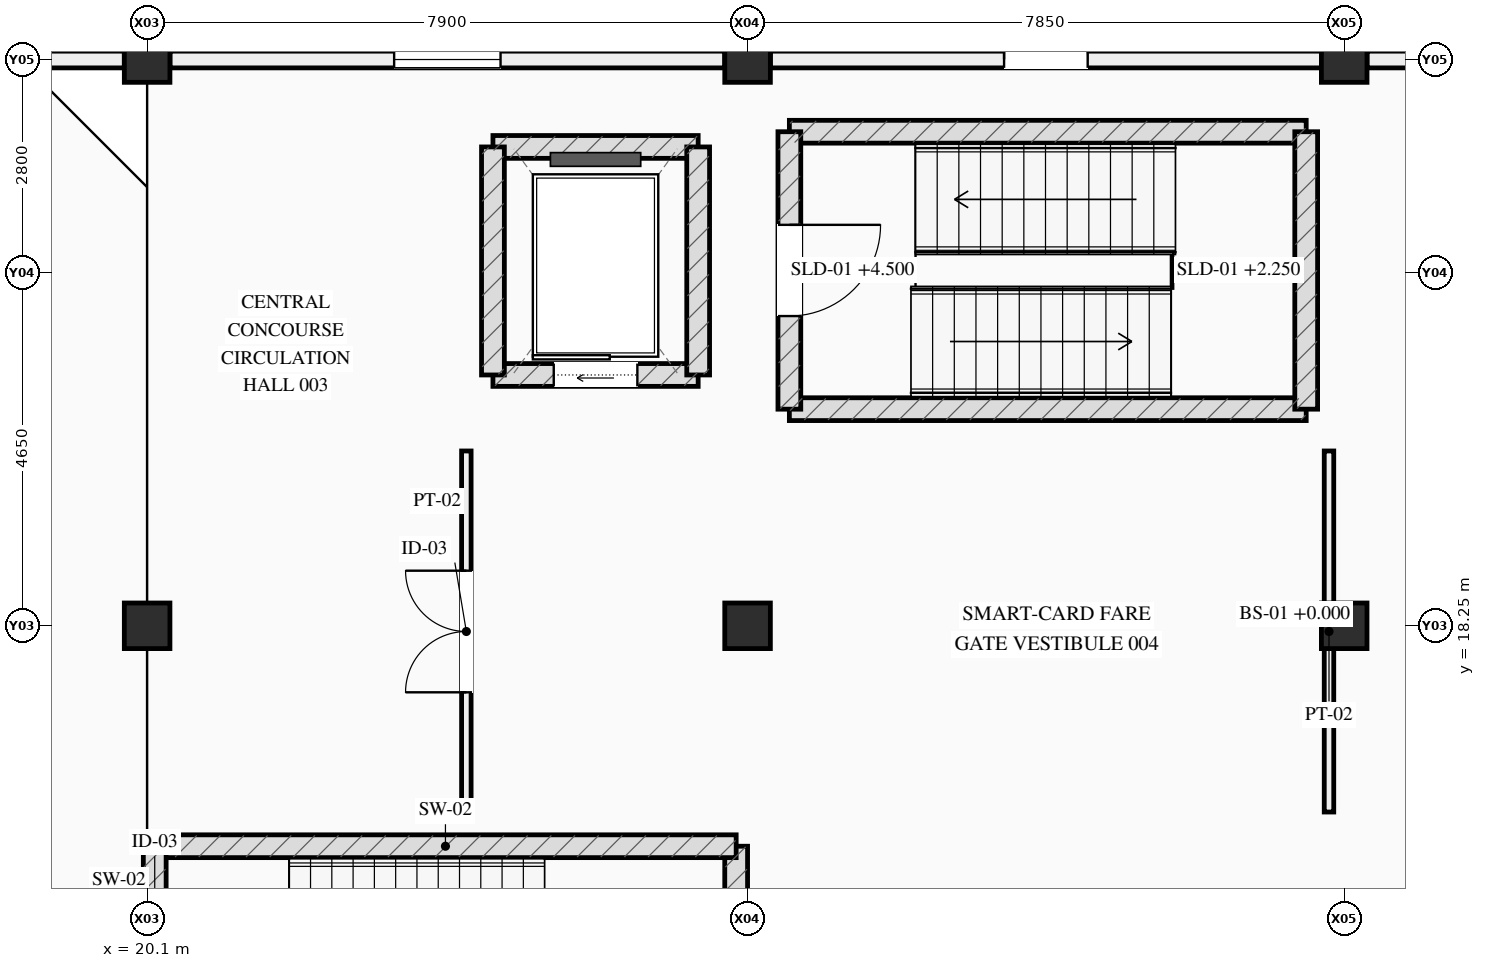
"""IFC4 building model, lengths in metres.
Left out: names, types, materials, properties, quantities, classifications, styles, units other than length and angle.
Written with IfcOpenShell. Run it as: python <this file> out.ifc"""

import sys

from ifc_helpers import new_model, si_unit, direction, frame, frame_2d, origin, origin_2d, place, context, subcontext, project, spatial, rectangle, extrude, element, fill, save


model = new_model("IFC4")
c1 = context("Model", 3, precision=1e-05, world=origin(), true_north=direction((0.0, 1.0)))
c2 = subcontext(c1, "Body", "Model", "MODEL_VIEW")
j1 = project(units=[si_unit("LENGTHUNIT", "METRE"), si_unit("PLANEANGLEUNIT", "RADIAN")], contexts=[c1])
p1 = place(None, origin())
s1 = spatial("IfcSite", under=j1, at=p1, CompositionType="ELEMENT")
p2 = place(p1, origin())
s2 = spatial("IfcBuilding", under=s1, at=p2, CompositionType="ELEMENT")
p3 = place(p2, origin())
s3 = spatial("IfcBuildingStorey", under=s2, at=p3, CompositionType="ELEMENT", Elevation=0.0)
for number, where, z_axis, x_axis in (
    (1, (20.1, 18.25, 0.0), (0.0, 0.0, 1.0), (1.0, 0.0, 0.0)),
    (2, (20.1, 25.7, 0.0), (0.0, 0.0, 1.0), (1.0, 0.0, 0.0)),
    (3, (28.0, 18.25, 0.0), (0.0, 0.0, 1.0), (1.0, 0.0, 0.0)),
    (4, (28.0, 25.7, 0.0), (0.0, 0.0, 1.0), (1.0, 0.0, 0.0)),
    (5, (35.85, 18.25, 0.0), (0.0, 0.0, 1.0), (1.0, 0.0, 0.0)),
    (6, (35.85, 25.7, 0.0), (0.0, 0.0, 1.0), (1.0, 0.0, 0.0)),
):
    element("IfcColumn", number, at=place(p3, frame(where, z_axis=z_axis, x_axis=x_axis)), inside=s3, PredefinedType="COLUMN", context=c2, shape_type="SweptSolid", body=[
        extrude(rectangle(XDim=0.6, YDim=0.6, at=origin_2d()), origin(), (0.0, 0.0, 1.0), 4.5),
    ])
p4 = place(p3, frame((12.5, 25.7, 0.0), z_axis=(0.0, 0.0, 1.0), x_axis=(1.0, 0.0, 0.0)))
e7 = element("IfcWall", 7, at=p4, inside=s3, PredefinedType="STANDARD", context=c2, shape_type="SweptSolid", body=[
    extrude(rectangle(XDim=7.3, YDim=0.22, at=frame_2d((3.65, 0.0))), origin(), (0.0, 0.0, 1.0), 3.58),
])
p5 = place(p4, frame((3.1, 0.0, 0.0)))
e8 = element("IfcOpeningElement", 8, at=p5, cuts=e7, PredefinedType="OPENING", context=c2, shape_type="SweptSolid", body=[
    extrude(rectangle(XDim=1.1, YDim=2.2, at=frame_2d((0.55, 1.1))), frame((0.0, 0.12, 0.0), z_axis=(0.0, -1.0, 0.0), x_axis=(1.0, 0.0, 0.0)), (0.0, 0.0, 1.0), 0.24),
])
p6 = place(p3, frame((20.4, 25.7, 0.0), z_axis=(0.0, 0.0, 1.0), x_axis=(1.0, 0.0, 0.0)))
e9 = element("IfcWall", 9, at=p6, inside=s3, PredefinedType="STANDARD", context=c2, shape_type="SweptSolid", body=[
    extrude(rectangle(XDim=7.3, YDim=0.22, at=frame_2d((3.65, 0.0))), origin(), (0.0, 0.0, 1.0), 3.58),
])
p7 = place(p6, frame((2.95, 0.0, 1.05)))
e10 = element("IfcOpeningElement", 10, at=p7, cuts=e9, PredefinedType="OPENING", context=c2, shape_type="SweptSolid", body=[
    extrude(rectangle(XDim=1.4, YDim=1.1, at=frame_2d((0.7, 0.55))), frame((0.0, 0.12, 0.0), z_axis=(0.0, -1.0, 0.0), x_axis=(1.0, 0.0, 0.0)), (0.0, 0.0, 1.0), 0.24),
])
p8 = place(p3, frame((28.3, 25.7, 0.0), z_axis=(0.0, 0.0, 1.0), x_axis=(1.0, 0.0, 0.0)))
e11 = element("IfcWall", 11, at=p8, inside=s3, PredefinedType="STANDARD", context=c2, shape_type="SweptSolid", body=[
    extrude(rectangle(XDim=7.25, YDim=0.22, at=frame_2d((3.625, 0.0))), origin(), (0.0, 0.0, 1.0), 3.58),
])
p9 = place(p8, frame((3.075, 0.0, 0.0)))
e12 = element("IfcOpeningElement", 12, at=p9, cuts=e11, PredefinedType="OPENING", context=c2, shape_type="SweptSolid", body=[
    extrude(rectangle(XDim=1.1, YDim=2.2, at=frame_2d((0.55, 1.1))), frame((0.0, 0.12, 0.0), z_axis=(0.0, -1.0, 0.0), x_axis=(1.0, 0.0, 0.0)), (0.0, 0.0, 1.0), 0.24),
])
p10 = place(p3, frame((36.15, 25.7, 0.0), z_axis=(0.0, 0.0, 1.0), x_axis=(1.0, 0.0, 0.0)))
e13 = element("IfcWall", 13, at=p10, inside=s3, PredefinedType="STANDARD", context=c2, shape_type="SweptSolid", body=[
    extrude(rectangle(XDim=7.25, YDim=0.22, at=frame_2d((3.625, 0.0))), origin(), (0.0, 0.0, 1.0), 3.24),
])
p11 = place(p10, frame((2.95, 0.0, 0.98)))
e14 = element("IfcOpeningElement", 14, at=p11, cuts=e13, PredefinedType="OPENING", context=c2, shape_type="SweptSolid", body=[
    extrude(rectangle(XDim=1.35, YDim=1.35, at=frame_2d((0.675, 0.675))), frame((0.0, 0.12, 0.0), z_axis=(0.0, -1.0, 0.0), x_axis=(1.0, 0.0, 0.0)), (0.0, 0.0, 1.0), 0.24),
])
for number, where, z_axis, x_axis in (
    (15, (35.35, 21.1, 0.0), (0.0, 0.0, 1.0), (-1.0, 0.0, 0.0)),
    (16, (28.55, 24.75, 0.0), (0.0, 0.0, 1.0), (1.0, 0.0, 0.0)),
):
    element("IfcWall", number, at=place(p3, frame(where, z_axis=z_axis, x_axis=x_axis)), inside=s3, PredefinedType="SHEAR", context=c2, shape_type="SweptSolid", body=[
        extrude(rectangle(XDim=6.8, YDim=0.3, at=frame_2d((3.4, 0.0))), origin(), (0.0, 0.0, 1.0), 4.26),
    ])
p12 = place(p3, frame((28.55, 21.1, 0.0), z_axis=(0.0, 0.0, 1.0), x_axis=(0.0, 1.0, 0.0)))
e17 = element("IfcWall", 17, at=p12, inside=s3, PredefinedType="SHEAR", context=c2, shape_type="SweptSolid", body=[
    extrude(rectangle(XDim=3.65, YDim=0.3, at=frame_2d((1.825, 0.0))), origin(), (0.0, 0.0, 1.0), 4.26),
])
p13 = place(p12, frame((1.225, 0.0, 0.0)))
e18 = element("IfcOpeningElement", 18, at=p13, cuts=e17, PredefinedType="OPENING", context=c2, shape_type="SweptSolid", body=[
    extrude(rectangle(XDim=1.2, YDim=2.2, at=frame_2d((0.6, 1.1))), frame((0.0, 0.16, 0.0), z_axis=(0.0, -1.0, 0.0), x_axis=(1.0, 0.0, 0.0)), (0.0, 0.0, 1.0), 0.32),
])
p14 = place(p3, frame((35.35, 24.75, 0.0), z_axis=(0.0, 0.0, 1.0), x_axis=(0.0, -1.0, 0.0)))
e19 = element("IfcWall", 19, at=p14, inside=s3, PredefinedType="SHEAR", context=c2, shape_type="SweptSolid", body=[
    extrude(rectangle(XDim=3.65, YDim=0.3, at=frame_2d((1.825, 0.0))), origin(), (0.0, 0.0, 1.0), 4.26),
])
p15 = place(p3, frame((24.65, 21.55, 0.0), z_axis=(0.0, 0.0, 1.0), x_axis=(1.0, 0.0, 0.0)))
e20 = element("IfcWall", 20, at=p15, inside=s3, PredefinedType="SHEAR", context=c2, shape_type="SweptSolid", body=[
    extrude(rectangle(XDim=2.7, YDim=0.3, at=frame_2d((1.35, 0.0))), origin(), (0.0, 0.0, 1.0), 4.26),
])
p16 = place(p15, frame((0.8, 0.0, 0.0)))
e21 = element("IfcOpeningElement", 21, at=p16, cuts=e20, PredefinedType="OPENING", context=c2, shape_type="SweptSolid", body=[
    extrude(rectangle(XDim=1.1, YDim=2.2, at=frame_2d((0.55, 1.1))), frame((0.0, 0.16, 0.0), z_axis=(0.0, -1.0, 0.0), x_axis=(1.0, 0.0, 0.0)), (0.0, 0.0, 1.0), 0.32),
])
p17 = place(p3, frame((24.65, 24.55, 0.0), z_axis=(0.0, 0.0, 1.0), x_axis=(1.0, 0.0, 0.0)))
e22 = element("IfcWall", 22, at=p17, inside=s3, PredefinedType="SHEAR", context=c2, shape_type="SweptSolid", body=[
    extrude(rectangle(XDim=2.7, YDim=0.3, at=frame_2d((1.35, 0.0))), origin(), (0.0, 0.0, 1.0), 4.26),
])
for number, where, z_axis, x_axis in (
    (23, (24.65, 21.55, 0.0), (0.0, 0.0, 1.0), (0.0, 1.0, 0.0)),
    (24, (27.35, 21.55, 0.0), (0.0, 0.0, 1.0), (0.0, 1.0, 0.0)),
):
    element("IfcWall", number, at=place(p3, frame(where, z_axis=z_axis, x_axis=x_axis)), inside=s3, PredefinedType="SHEAR", context=c2, shape_type="SweptSolid", body=[
        extrude(rectangle(XDim=3.0, YDim=0.3, at=frame_2d((1.5, 0.0))), origin(), (0.0, 0.0, 1.0), 4.26),
    ])
p18 = place(p3, frame((27.85, 11.45, 0.0), z_axis=(0.0, 0.0, 1.0), x_axis=(0.0, 1.0, 0.0)))
e25 = element("IfcWall", 25, at=p18, inside=s3, PredefinedType="SHEAR", context=c2, shape_type="SweptSolid", body=[
    extrude(rectangle(XDim=3.9, YDim=0.3, at=frame_2d((1.95, 0.0))), origin(), (0.0, 0.0, 1.0), 4.26),
])
p19 = place(p3, frame((20.2, 15.35, 0.0), z_axis=(0.0, 0.0, 1.0), x_axis=(1.0, 0.0, 0.0)))
e26 = element("IfcWall", 26, at=p19, inside=s3, PredefinedType="SHEAR", context=c2, shape_type="SweptSolid", body=[
    extrude(rectangle(XDim=7.65, YDim=0.3, at=frame_2d((3.825, 0.0))), origin(), (0.0, 0.0, 1.0), 4.26),
])
p20 = place(p3, frame((20.2, 11.45, 0.0), z_axis=(0.0, 0.0, 1.0), x_axis=(0.0, 1.0, 0.0)))
e27 = element("IfcWall", 27, at=p20, inside=s3, PredefinedType="SHEAR", context=c2, shape_type="SweptSolid", body=[
    extrude(rectangle(XDim=3.9, YDim=0.3, at=frame_2d((1.95, 0.0))), origin(), (0.0, 0.0, 1.0), 4.26),
])
p21 = place(p20, frame((1.15, 0.0, 0.0)))
e28 = element("IfcOpeningElement", 28, at=p21, cuts=e27, PredefinedType="OPENING", context=c2, shape_type="SweptSolid", body=[
    extrude(rectangle(XDim=1.6, YDim=2.2, at=frame_2d((0.8, 1.1))), frame((0.0, 0.16, 0.0), z_axis=(0.0, -1.0, 0.0), x_axis=(1.0, 0.0, 0.0)), (0.0, 0.0, 1.0), 0.32),
])
p22 = place(p3, frame((24.3, 15.8, 0.0), z_axis=(0.0, 0.0, 1.0), x_axis=(0.0, 1.0, 0.0)))
e29 = element("IfcWall", 29, at=p22, inside=s3, PredefinedType="PARTITIONING", context=c2, shape_type="SweptSolid", body=[
    extrude(rectangle(XDim=4.75, YDim=0.125, at=frame_2d((2.375, 0.0))), origin(), (0.0, 0.0, 1.0), 3.3),
])
p23 = place(p22, frame((1.575, 0.0, 0.0)))
e30 = element("IfcOpeningElement", 30, at=p23, cuts=e29, PredefinedType="OPENING", context=c2, shape_type="SweptSolid", body=[
    extrude(rectangle(XDim=1.6, YDim=2.2, at=frame_2d((0.8, 1.1))), frame((0.0, 0.073, 0.0), z_axis=(0.0, -1.0, 0.0), x_axis=(1.0, 0.0, 0.0)), (0.0, 0.0, 1.0), 0.145),
])
p24 = place(p3, frame((35.65, 15.8, 0.0), z_axis=(0.0, 0.0, 1.0), x_axis=(0.0, 1.0, 0.0)))
e31 = element("IfcWall", 31, at=p24, inside=s3, PredefinedType="PARTITIONING", context=c2, shape_type="SweptSolid", body=[
    extrude(rectangle(XDim=4.75, YDim=0.125, at=frame_2d((2.375, 0.0))), origin(), (0.0, 0.0, 1.0), 3.3),
])
p25 = place(p7, origin())
e32 = element("IfcWindow", 32, at=p25, inside=s3, PartitioningType="SINGLE_PANEL", PredefinedType="WINDOW", context=c2, shape_type="SweptSolid", body=[
    extrude(rectangle(XDim=1.4, YDim=1.1, at=frame_2d((0.7, 0.55))), frame((0.0, 0.03, 0.0), z_axis=(0.0, -1.0, 0.0), x_axis=(1.0, 0.0, 0.0)), (0.0, 0.0, 1.0), 0.06),
])
fill(e10, e32)
p26 = place(p9, origin())
e33 = element("IfcDoor", 33, at=p26, inside=s3, OperationType="SINGLE_SWING_LEFT", PredefinedType="DOOR", context=c2, shape_type="SweptSolid", body=[
    extrude(rectangle(XDim=1.1, YDim=2.2, at=frame_2d((0.55, 1.1))), frame((0.0, 0.025, 0.0), z_axis=(0.0, -1.0, 0.0), x_axis=(1.0, 0.0, 0.0)), (0.0, 0.0, 1.0), 0.05),
])
fill(e12, e33)
p27 = place(p13, origin())
e34 = element("IfcDoor", 34, at=p27, inside=s3, OperationType="SINGLE_SWING_RIGHT", PredefinedType="DOOR", context=c2, shape_type="SweptSolid", body=[
    extrude(rectangle(XDim=1.2, YDim=2.2, at=frame_2d((0.6, 1.1))), frame((0.0, 0.025, 0.0), z_axis=(0.0, -1.0, 0.0), x_axis=(1.0, 0.0, 0.0)), (0.0, 0.0, 1.0), 0.05),
])
fill(e18, e34)
p28 = place(p16, origin())
e35 = element("IfcDoor", 35, at=p28, inside=s3, OperationType="SLIDING_TO_LEFT", PredefinedType="DOOR", context=c2, shape_type="SweptSolid", body=[
    extrude(rectangle(XDim=1.1, YDim=2.2, at=frame_2d((0.55, 1.1))), frame((0.0, 0.025, 0.0), z_axis=(0.0, -1.0, 0.0), x_axis=(1.0, 0.0, 0.0)), (0.0, 0.0, 1.0), 0.05),
])
fill(e21, e35)
p29 = place(p23, origin())
e36 = element("IfcDoor", 36, at=p29, inside=s3, OperationType="DOUBLE_DOOR_SINGLE_SWING", PredefinedType="DOOR", context=c2, shape_type="SweptSolid", body=[
    extrude(rectangle(XDim=1.6, YDim=2.2, at=frame_2d((0.8, 1.1))), frame((0.0, 0.025, 0.0), z_axis=(0.0, -1.0, 0.0), x_axis=(1.0, 0.0, 0.0)), (0.0, 0.0, 1.0), 0.05),
])
fill(e30, e36)
save(model, sys.argv[1])
